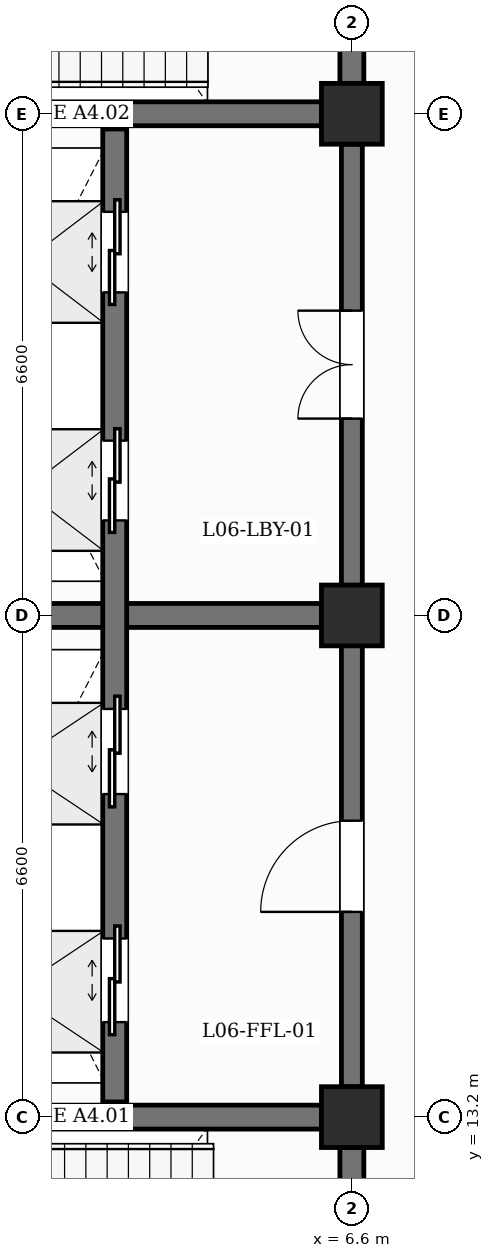
"""IFC4 building model, lengths in metres.
Left out: names, types, materials, properties, quantities, classifications, styles, units other than length and angle.
Written with IfcOpenShell. Run it as: python <this file> out.ifc"""

import sys

from ifc_helpers import new_model, si_unit, direction, frame, frame_2d, origin, origin_2d, place, context, subcontext, project, spatial, rectangle, extrude, element, fill, save


model = new_model("IFC4")
c1 = context("Model", 3, precision=1e-05, world=origin(), true_north=direction((0.0, 1.0)))
c2 = subcontext(c1, "Body", "Model", "MODEL_VIEW")
j1 = project(units=[si_unit("LENGTHUNIT", "METRE"), si_unit("PLANEANGLEUNIT", "RADIAN")], contexts=[c1])
p1 = place(None, origin())
s1 = spatial("IfcSite", under=j1, at=p1, CompositionType="ELEMENT")
p2 = place(p1, origin())
s2 = spatial("IfcBuilding", under=s1, at=p2, CompositionType="ELEMENT")
p3 = place(p2, frame((0.0, 0.0, 27.0)))
s3 = spatial("IfcBuildingStorey", under=s2, at=p3, CompositionType="ELEMENT", Elevation=27.0)
for number, where, z_axis, x_axis in (
    (1, (6.6, 13.2, 0.0), (0.0, 0.0, 1.0), (1.0, 0.0, 0.0)),
    (2, (6.6, 19.8, 0.0), (0.0, 0.0, 1.0), (1.0, 0.0, 0.0)),
    (3, (6.6, 26.4, 0.0), (0.0, 0.0, 1.0), (1.0, 0.0, 0.0)),
):
    element("IfcColumn", number, at=place(p3, frame(where, z_axis=z_axis, x_axis=x_axis)), inside=s3, PredefinedType="COLUMN", context=c2, shape_type="SweptSolid", body=[
        extrude(rectangle(XDim=0.8, YDim=0.8, at=origin_2d()), origin(), (0.0, 0.0, 1.0), 4.2),
    ])
p4 = place(p3, frame((0.4, 13.2, 0.0), z_axis=(0.0, 0.0, 1.0), x_axis=(1.0, 0.0, 0.0)))
e4 = element("IfcWall", 4, at=p4, inside=s3, PredefinedType="SHEAR", context=c2, shape_type="SweptSolid", body=[
    extrude(rectangle(XDim=5.8, YDim=0.315, at=frame_2d((2.9, 0.0))), origin(), (0.0, 0.0, 1.0), 3.17),
])
p5 = place(p3, frame((6.6, 7.0, 0.0), z_axis=(0.0, 0.0, 1.0), x_axis=(0.0, 1.0, 0.0)))
e5 = element("IfcWall", 5, at=p5, inside=s3, PredefinedType="SHEAR", context=c2, shape_type="SweptSolid", body=[
    extrude(rectangle(XDim=5.8, YDim=0.315, at=frame_2d((2.9, 0.0))), origin(), (0.0, 0.0, 1.0), 3.17),
])
p6 = place(p5, frame((2.325, 0.0, 0.0)))
e6 = element("IfcOpeningElement", 6, at=p6, cuts=e5, PredefinedType="OPENING", context=c2, shape_type="SweptSolid", body=[
    extrude(rectangle(XDim=1.15, YDim=2.2, at=frame_2d((0.575, 1.1))), frame((0.0, 0.167, 0.0), z_axis=(0.0, -1.0, 0.0), x_axis=(1.0, 0.0, 0.0)), (0.0, 0.0, 1.0), 0.335),
])
p7 = place(p3, frame((0.4, 26.4, 0.0), z_axis=(0.0, 0.0, 1.0), x_axis=(1.0, 0.0, 0.0)))
e7 = element("IfcWall", 7, at=p7, inside=s3, PredefinedType="SHEAR", context=c2, shape_type="SweptSolid", body=[
    extrude(rectangle(XDim=5.8, YDim=0.315, at=frame_2d((2.9, 0.0))), origin(), (0.0, 0.0, 1.0), 3.17),
])
p8 = place(p3, frame((6.6, 26.8, 0.0), z_axis=(0.0, 0.0, 1.0), x_axis=(0.0, 1.0, 0.0)))
e8 = element("IfcWall", 8, at=p8, inside=s3, PredefinedType="SHEAR", context=c2, shape_type="SweptSolid", body=[
    extrude(rectangle(XDim=5.8, YDim=0.315, at=frame_2d((2.9, 0.0))), origin(), (0.0, 0.0, 1.0), 3.17),
])
p9 = place(p8, frame((2.325, 0.0, 0.0)))
e9 = element("IfcOpeningElement", 9, at=p9, cuts=e8, PredefinedType="OPENING", context=c2, shape_type="SweptSolid", body=[
    extrude(rectangle(XDim=1.15, YDim=2.2, at=frame_2d((0.575, 1.1))), frame((0.0, 0.167, 0.0), z_axis=(0.0, -1.0, 0.0), x_axis=(1.0, 0.0, 0.0)), (0.0, 0.0, 1.0), 0.335),
])
p10 = place(p3, frame((0.4, 19.8, 0.0), z_axis=(0.0, 0.0, 1.0), x_axis=(1.0, 0.0, 0.0)))
e10 = element("IfcWall", 10, at=p10, inside=s3, PredefinedType="SHEAR", context=c2, shape_type="SweptSolid", body=[
    extrude(rectangle(XDim=5.8, YDim=0.315, at=frame_2d((2.9, 0.0))), origin(), (0.0, 0.0, 1.0), 3.17),
])
p11 = place(p3, frame((6.6, 13.6, 0.0), z_axis=(0.0, 0.0, 1.0), x_axis=(0.0, 1.0, 0.0)))
e11 = element("IfcWall", 11, at=p11, inside=s3, PredefinedType="SHEAR", context=c2, shape_type="SweptSolid", body=[
    extrude(rectangle(XDim=5.8, YDim=0.275, at=frame_2d((2.9, 0.0))), origin(), (0.0, 0.0, 1.0), 3.17),
])
p12 = place(p11, frame((2.3, 0.0, 0.0)))
e12 = element("IfcOpeningElement", 12, at=p12, cuts=e11, PredefinedType="OPENING", context=c2, shape_type="SweptSolid", body=[
    extrude(rectangle(XDim=1.2, YDim=2.25, at=frame_2d((0.6, 1.125))), frame((0.0, 0.147, 0.0), z_axis=(0.0, -1.0, 0.0), x_axis=(1.0, 0.0, 0.0)), (0.0, 0.0, 1.0), 0.295),
])
p13 = place(p3, frame((6.6, 20.2, 0.0), z_axis=(0.0, 0.0, 1.0), x_axis=(0.0, 1.0, 0.0)))
e13 = element("IfcWall", 13, at=p13, inside=s3, PredefinedType="SHEAR", context=c2, shape_type="SweptSolid", body=[
    extrude(rectangle(XDim=5.8, YDim=0.275, at=frame_2d((2.9, 0.0))), origin(), (0.0, 0.0, 1.0), 3.17),
])
p14 = place(p13, frame((2.19, 0.0, 0.0)))
e14 = element("IfcOpeningElement", 14, at=p14, cuts=e13, PredefinedType="OPENING", context=c2, shape_type="SweptSolid", body=[
    extrude(rectangle(XDim=1.42, YDim=2.2, at=frame_2d((0.71, 1.1))), frame((0.0, 0.147, 0.0), z_axis=(0.0, -1.0, 0.0), x_axis=(1.0, 0.0, 0.0)), (0.0, 0.0, 1.0), 0.295),
])
p15 = place(p3, frame((3.48, 13.4, 0.0), z_axis=(0.0, 0.0, 1.0), x_axis=(0.0, 1.0, 0.0)))
e15 = element("IfcWall", 15, at=p15, inside=s3, PredefinedType="SHEAR", context=c2, shape_type="SweptSolid", body=[
    extrude(rectangle(XDim=6.2, YDim=0.315, at=frame_2d((3.1, 0.0))), origin(), (0.0, 0.0, 1.0), 3.87),
])
p16 = place(p15, frame((1.05, 0.0, 0.0)))
e16 = element("IfcOpeningElement", 16, at=p16, cuts=e15, PredefinedType="OPENING", context=c2, shape_type="SweptSolid", body=[
    extrude(rectangle(XDim=1.1, YDim=2.15, at=frame_2d((0.55, 1.075))), frame((0.0, 0.167, 0.0), z_axis=(0.0, -1.0, 0.0), x_axis=(1.0, 0.0, 0.0)), (0.0, 0.0, 1.0), 0.335),
])
p17 = place(p15, frame((4.05, 0.0, 0.0)))
e17 = element("IfcOpeningElement", 17, at=p17, cuts=e15, PredefinedType="OPENING", context=c2, shape_type="SweptSolid", body=[
    extrude(rectangle(XDim=1.12, YDim=2.15, at=frame_2d((0.56, 1.075))), frame((0.0, 0.167, 0.0), z_axis=(0.0, -1.0, 0.0), x_axis=(1.0, 0.0, 0.0)), (0.0, 0.0, 1.0), 0.335),
])
p18 = place(p3, frame((3.48, 20.0, 0.0), z_axis=(0.0, 0.0, 1.0), x_axis=(0.0, 1.0, 0.0)))
e18 = element("IfcWall", 18, at=p18, inside=s3, PredefinedType="SHEAR", context=c2, shape_type="SweptSolid", body=[
    extrude(rectangle(XDim=6.2, YDim=0.315, at=frame_2d((3.1, 0.0))), origin(), (0.0, 0.0, 1.0), 3.87),
])
p19 = place(p18, frame((1.05, 0.0, 0.0)))
e19 = element("IfcOpeningElement", 19, at=p19, cuts=e18, PredefinedType="OPENING", context=c2, shape_type="SweptSolid", body=[
    extrude(rectangle(XDim=1.05, YDim=2.15, at=frame_2d((0.525, 1.075))), frame((0.0, 0.167, 0.0), z_axis=(0.0, -1.0, 0.0), x_axis=(1.0, 0.0, 0.0)), (0.0, 0.0, 1.0), 0.335),
])
p20 = place(p18, frame((4.05, 0.0, 0.0)))
e20 = element("IfcOpeningElement", 20, at=p20, cuts=e18, PredefinedType="OPENING", context=c2, shape_type="SweptSolid", body=[
    extrude(rectangle(XDim=1.06, YDim=2.15, at=frame_2d((0.53, 1.075))), frame((0.0, 0.167, 0.0), z_axis=(0.0, -1.0, 0.0), x_axis=(1.0, 0.0, 0.0)), (0.0, 0.0, 1.0), 0.335),
])
p21 = place(p16, origin())
e21 = element("IfcDoor", 21, at=p21, inside=s3, OperationType="DOUBLE_DOOR_SLIDING", PredefinedType="USERDEFINED", context=c2, shape_type="SweptSolid", body=[
    extrude(rectangle(XDim=1.1, YDim=2.15, at=frame_2d((0.55, 1.075))), frame((0.0, 0.025, 0.0), z_axis=(0.0, -1.0, 0.0), x_axis=(1.0, 0.0, 0.0)), (0.0, 0.0, 1.0), 0.05),
])
fill(e16, e21)
p22 = place(p17, origin())
e22 = element("IfcDoor", 22, at=p22, inside=s3, OperationType="DOUBLE_DOOR_SLIDING", PredefinedType="USERDEFINED", context=c2, shape_type="SweptSolid", body=[
    extrude(rectangle(XDim=1.12, YDim=2.15, at=frame_2d((0.56, 1.075))), frame((0.0, 0.025, 0.0), z_axis=(0.0, -1.0, 0.0), x_axis=(1.0, 0.0, 0.0)), (0.0, 0.0, 1.0), 0.05),
])
fill(e17, e22)
p23 = place(p19, origin())
e23 = element("IfcDoor", 23, at=p23, inside=s3, OperationType="DOUBLE_DOOR_SLIDING", PredefinedType="USERDEFINED", context=c2, shape_type="SweptSolid", body=[
    extrude(rectangle(XDim=1.05, YDim=2.15, at=frame_2d((0.525, 1.075))), frame((0.0, 0.025, 0.0), z_axis=(0.0, -1.0, 0.0), x_axis=(1.0, 0.0, 0.0)), (0.0, 0.0, 1.0), 0.05),
])
fill(e19, e23)
p24 = place(p20, origin())
e24 = element("IfcDoor", 24, at=p24, inside=s3, OperationType="DOUBLE_DOOR_SLIDING", PredefinedType="USERDEFINED", context=c2, shape_type="SweptSolid", body=[
    extrude(rectangle(XDim=1.06, YDim=2.15, at=frame_2d((0.53, 1.075))), frame((0.0, 0.025, 0.0), z_axis=(0.0, -1.0, 0.0), x_axis=(1.0, 0.0, 0.0)), (0.0, 0.0, 1.0), 0.05),
])
fill(e20, e24)
p25 = place(p12, origin())
e25 = element("IfcDoor", 25, at=p25, inside=s3, OperationType="SINGLE_SWING_LEFT", PredefinedType="DOOR", context=c2, shape_type="SweptSolid", body=[
    extrude(rectangle(XDim=1.2, YDim=2.25, at=frame_2d((0.6, 1.125))), frame((0.0, 0.025, 0.0), z_axis=(0.0, -1.0, 0.0), x_axis=(1.0, 0.0, 0.0)), (0.0, 0.0, 1.0), 0.05),
])
fill(e12, e25)
p26 = place(p14, origin())
e26 = element("IfcDoor", 26, at=p26, inside=s3, OperationType="DOUBLE_DOOR_SINGLE_SWING", PredefinedType="DOOR", context=c2, shape_type="SweptSolid", body=[
    extrude(rectangle(XDim=1.42, YDim=2.2, at=frame_2d((0.71, 1.1))), frame((0.0, 0.025, 0.0), z_axis=(0.0, -1.0, 0.0), x_axis=(1.0, 0.0, 0.0)), (0.0, 0.0, 1.0), 0.05),
])
fill(e14, e26)
save(model, sys.argv[1])
